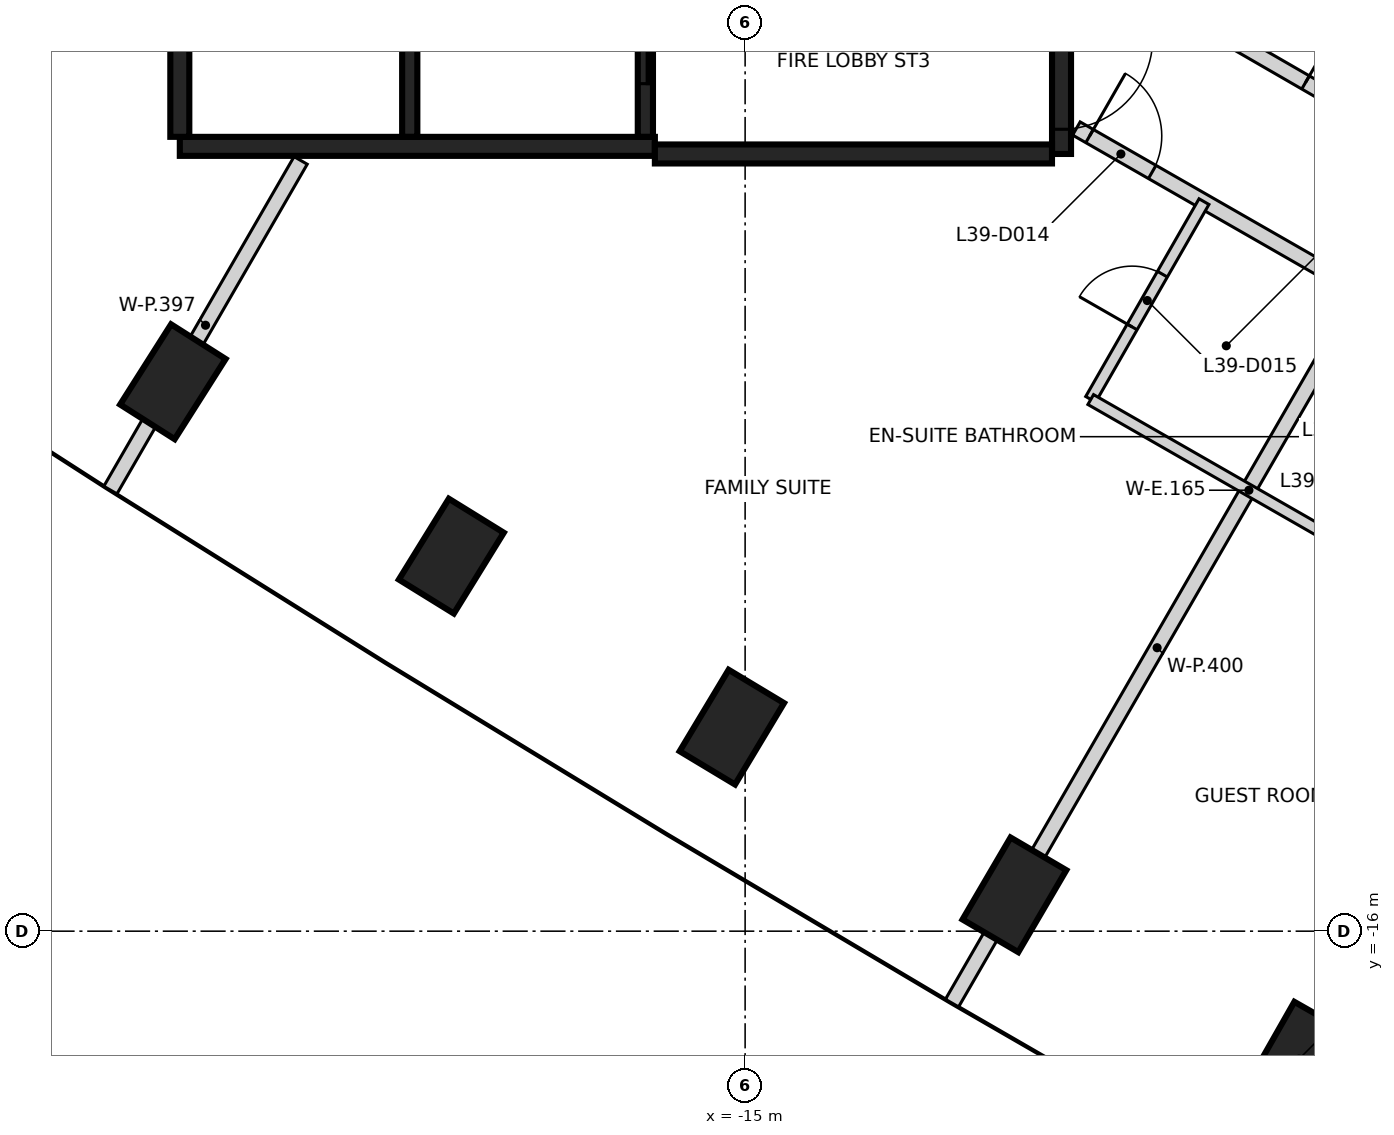
"""IFC4 building model, lengths in metres.
Left out: names, types, materials, properties, quantities, classifications, styles, units other than length and angle.
Written with IfcOpenShell. Run it as: python <this file> out.ifc"""

import sys

from ifc_helpers import new_model, si_unit, direction, frame, frame_2d, origin, origin_2d, place, context, subcontext, project, spatial, rectangle, extrude, element, fill, save


model = new_model("IFC4")
c1 = context("Model", 3, precision=1e-05, world=origin(), true_north=direction((0.0, 1.0)))
c2 = subcontext(c1, "Body", "Model", "MODEL_VIEW")
j1 = project(units=[si_unit("LENGTHUNIT", "METRE"), si_unit("PLANEANGLEUNIT", "RADIAN")], contexts=[c1])
p1 = place(None, origin())
s1 = spatial("IfcSite", under=j1, at=p1, CompositionType="ELEMENT")
p2 = place(p1, origin())
s2 = spatial("IfcBuilding", under=s1, at=p2, CompositionType="ELEMENT")
p3 = place(p2, frame((0.0, 0.0, 157.6)))
s3 = spatial("IfcBuildingStorey", under=s2, at=p3, CompositionType="ELEMENT", Elevation=157.6)
for number, where, z_axis, x_axis in (
    (1, (-22.529, -8.772, -0.4), (0.0, 0.0, 1.0), (0.536, 0.844, 0.0)),
    (2, (-18.865, -11.066, -0.4), (0.0, 0.0, 1.0), (0.526, 0.851, 0.0)),
    (3, (-15.175, -13.316, -0.4), (0.0, 0.0, 1.0), (0.515, 0.857, 0.0)),
    (4, (-11.457, -15.522, -0.4), (0.0, 0.0, 1.0), (0.505, 0.863, 0.0)),
    (5, (-7.714, -17.683, -0.4), (0.0, 0.0, 1.0), (0.495, 0.869, 0.0)),
):
    element("IfcColumn", number, at=place(p3, frame(where, z_axis=z_axis, x_axis=x_axis)), inside=s3, PredefinedType="COLUMN", context=c2, shape_type="SweptSolid", body=[
        extrude(rectangle(XDim=1.25, YDim=0.85, at=origin_2d()), origin(), (0.0, 0.0, 1.0), 3.6),
    ])
p4 = place(p3, frame((-10.837, 5.775, 0.0), z_axis=(0.0, 0.0, 1.0), x_axis=(0.0, -1.0, 0.0)))
e6 = element("IfcWall", 6, at=p4, inside=s3, PredefinedType="SHEAR", context=c2, shape_type="SweptSolid", body=[
    extrude(rectangle(XDim=11.55, YDim=0.25, at=frame_2d((5.775, 0.0))), origin(), (0.0, 0.0, 1.0), 3.2),
])
p5 = place(p4, frame((10.025, 0.0, 0.0)))
e7 = element("IfcOpeningElement", 7, at=p5, cuts=e6, PredefinedType="OPENING", context=c2, shape_type="SweptSolid", body=[
    extrude(rectangle(XDim=1.2, YDim=2.1, at=frame_2d((0.6, 1.05))), frame((0.0, 0.135, 0.0), z_axis=(0.0, -1.0, 0.0), x_axis=(1.0, 0.0, 0.0)), (0.0, 0.0, 1.0), 0.27),
])
p6 = place(p4, frame((8.725, 0.0, 0.0)))
e8 = element("IfcOpeningElement", 8, at=p6, cuts=e6, PredefinedType="OPENING", context=c2, shape_type="SweptSolid", body=[
    extrude(rectangle(XDim=1.2, YDim=2.1, at=frame_2d((0.6, 1.05))), frame((0.0, 0.135, 0.0), z_axis=(0.0, -1.0, 0.0), x_axis=(1.0, 0.0, 0.0)), (0.0, 0.0, 1.0), 0.27),
])
p7 = place(p3, frame((-16.187, -5.675, 0.0), z_axis=(0.0, 0.0, 1.0), x_axis=(-1.0, 0.0, 0.0)))
e9 = element("IfcWall", 9, at=p7, inside=s3, PredefinedType="SHEAR", context=c2, shape_type="SweptSolid", body=[
    extrude(rectangle(XDim=6.25, YDim=0.25, at=frame_2d((3.125, 0.0))), origin(), (0.0, 0.0, 1.0), 3.2),
])
p8 = place(p3, frame((-10.963, -5.775, 0.0), z_axis=(0.0, 0.0, 1.0), x_axis=(-1.0, 0.0, 0.0)))
e10 = element("IfcWall", 10, at=p8, inside=s3, PredefinedType="SHEAR", context=c2, shape_type="SweptSolid", body=[
    extrude(rectangle(XDim=5.225, YDim=0.25, at=frame_2d((2.612, 0.0))), origin(), (0.0, 0.0, 1.0), 3.2),
])
p9 = place(p3, frame((-22.437, -5.55, 0.0), z_axis=(0.0, 0.0, 1.0), x_axis=(0.0, 1.0, 0.0)))
e11 = element("IfcWall", 11, at=p9, inside=s3, PredefinedType="SHEAR", context=c2, shape_type="SweptSolid", body=[
    extrude(rectangle(XDim=1.849, YDim=0.25, at=frame_2d((0.925, 0.0))), origin(), (0.0, 0.0, 1.0), 3.2),
])
p10 = place(p3, frame((-16.312, -2.898, 0.0), z_axis=(0.0, 0.0, 1.0), x_axis=(0.0, -1.0, 0.0)))
e12 = element("IfcWall", 12, at=p10, inside=s3, PredefinedType="SHEAR", context=c2, shape_type="SweptSolid", body=[
    extrude(rectangle(XDim=2.651, YDim=0.2, at=frame_2d((1.325, 0.0))), origin(), (0.0, 0.0, 1.0), 3.2),
])
p11 = place(p10, frame((0.652, 0.0, 0.0)))
e13 = element("IfcOpeningElement", 13, at=p11, cuts=e12, PredefinedType="OPENING", context=c2, shape_type="SweptSolid", body=[
    extrude(rectangle(XDim=1.3, YDim=2.1, at=frame_2d((0.65, 1.05))), frame((0.0, 0.11, 0.0), z_axis=(0.0, -1.0, 0.0), x_axis=(1.0, 0.0, 0.0)), (0.0, 0.0, 1.0), 0.22),
])
p12 = place(p3, frame((-19.412, -5.549, 0.0), z_axis=(0.0, 0.0, 1.0), x_axis=(0.0, 1.0, 0.0)))
e14 = element("IfcWall", 14, at=p12, inside=s3, PredefinedType="SHEAR", context=c2, shape_type="SweptSolid", body=[
    extrude(rectangle(XDim=2.651, YDim=0.2, at=frame_2d((1.325, 0.0))), origin(), (0.0, 0.0, 1.0), 3.2),
])
p13 = place(p3, frame((-10.642, -5.44, 0.0), z_axis=(0.0, 0.0, 1.0), x_axis=(0.867610688994, -0.497244097344, 0.0)))
e15 = element("IfcWall", 15, at=p13, inside=s3, PredefinedType="PARTITIONING", context=c2, shape_type="SweptSolid", body=[
    extrude(rectangle(XDim=10.464, YDim=0.2, at=frame_2d((5.232, 0.0))), origin(), (0.0, 0.0, 1.0), 3.2),
])
p14 = place(p13, frame((0.2, 0.0, 0.0)))
e16 = element("IfcOpeningElement", 16, at=p14, cuts=e15, PredefinedType="OPENING", context=c2, shape_type="SweptSolid", body=[
    extrude(rectangle(XDim=0.95, YDim=2.1, at=frame_2d((0.475, 1.05))), frame((0.0, 0.11, 0.0), z_axis=(0.0, -1.0, 0.0), x_axis=(1.0, 0.0, 0.0)), (0.0, 0.0, 1.0), 0.22),
])
p15 = place(p13, frame((7.519, 0.0, 0.0)))
e17 = element("IfcOpeningElement", 17, at=p15, cuts=e15, PredefinedType="OPENING", context=c2, shape_type="SweptSolid", body=[
    extrude(rectangle(XDim=0.95, YDim=2.1, at=frame_2d((0.475, 1.05))), frame((0.0, 0.11, 0.0), z_axis=(0.0, -1.0, 0.0), x_axis=(1.0, 0.0, 0.0)), (0.0, 0.0, 1.0), 0.22),
])
p16 = place(p13, frame((8.846, 0.0, 0.0)))
e18 = element("IfcOpeningElement", 18, at=p16, cuts=e15, PredefinedType="OPENING", context=c2, shape_type="SweptSolid", body=[
    extrude(rectangle(XDim=0.95, YDim=2.1, at=frame_2d((0.475, 1.05))), frame((0.0, 0.11, 0.0), z_axis=(0.0, -1.0, 0.0), x_axis=(1.0, 0.0, 0.0)), (0.0, 0.0, 1.0), 0.22),
])
p17 = place(p3, frame((-8.612, -4.265, 0.0), z_axis=(0.0, 0.0, 1.0), x_axis=(0.865984415152, -0.500070987675, 0.0)))
e19 = element("IfcWall", 19, at=p17, inside=s3, PredefinedType="PARTITIONING", context=c2, shape_type="SweptSolid", body=[
    extrude(rectangle(XDim=10.651, YDim=0.2, at=frame_2d((5.326, 0.0))), origin(), (0.0, 0.0, 1.0), 3.2),
])
p18 = place(p17, frame((1.138, 0.0, 0.0)))
e20 = element("IfcOpeningElement", 20, at=p18, cuts=e19, PredefinedType="OPENING", context=c2, shape_type="SweptSolid", body=[
    extrude(rectangle(XDim=0.9, YDim=2.1, at=frame_2d((0.45, 1.05))), frame((0.0, 0.11, 0.0), z_axis=(0.0, -1.0, 0.0), x_axis=(1.0, 0.0, 0.0)), (0.0, 0.0, 1.0), 0.22),
])
p19 = place(p17, frame((4.876, 0.0, 0.0)))
e21 = element("IfcOpeningElement", 21, at=p19, cuts=e19, PredefinedType="OPENING", context=c2, shape_type="SweptSolid", body=[
    extrude(rectangle(XDim=0.9, YDim=2.1, at=frame_2d((0.45, 1.05))), frame((0.0, 0.11, 0.0), z_axis=(0.0, -1.0, 0.0), x_axis=(1.0, 0.0, 0.0)), (0.0, 0.0, 1.0), 0.22),
])
p20 = place(p17, frame((8.613, 0.0, 0.0)))
e22 = element("IfcOpeningElement", 22, at=p20, cuts=e19, PredefinedType="OPENING", context=c2, shape_type="SweptSolid", body=[
    extrude(rectangle(XDim=0.9, YDim=2.1, at=frame_2d((0.45, 1.05))), frame((0.0, 0.11, 0.0), z_axis=(0.0, -1.0, 0.0), x_axis=(1.0, 0.0, 0.0)), (0.0, 0.0, 1.0), 0.22),
])
p21 = place(p3, frame((-23.351, -10.197, 0.0), z_axis=(0.0, 0.0, 1.0), x_axis=(0.499872996861, 0.866098716665, 0.0)))
e23 = element("IfcWall", 23, at=p21, inside=s3, PredefinedType="PARTITIONING", context=c2, shape_type="SweptSolid", body=[
    extrude(rectangle(XDim=5.007, YDim=0.2, at=frame_2d((2.503, 0.0))), origin(), (0.0, 0.0, 1.0), 3.2),
])
p22 = place(p3, frame((-12.278, -16.946, 0.0), z_axis=(0.0, 0.0, 1.0), x_axis=(0.499882324153, 0.866093333307, 0.0)))
e24 = element("IfcWall", 24, at=p22, inside=s3, PredefinedType="PARTITIONING", context=c2, shape_type="SweptSolid", body=[
    extrude(rectangle(XDim=10.796, YDim=0.2, at=frame_2d((5.398, 0.0))), origin(), (0.0, 0.0, 1.0), 3.2),
])
p23 = place(p3, frame((-8.535, -19.107, 0.0), z_axis=(0.0, 0.0, 1.0), x_axis=(0.499987057201, 0.866032876184, 0.0)))
e25 = element("IfcWall", 25, at=p23, inside=s3, PredefinedType="PARTITIONING", context=c2, shape_type="SweptSolid", body=[
    extrude(rectangle(XDim=10.809, YDim=0.2, at=frame_2d((5.404, 0.0))), origin(), (0.0, 0.0, 1.0), 3.2),
])
p24 = place(p3, frame((-8.0, -0.924, 0.0), z_axis=(0.0, 0.0, 1.0), x_axis=(0.86604129137, -0.499972480886, 0.0)))
e26 = element("IfcWall", 26, at=p24, inside=s3, PredefinedType="PARTITIONING", context=c2, shape_type="SweptSolid", body=[
    extrude(rectangle(XDim=12.932, YDim=0.2, at=frame_2d((6.466, 0.0))), origin(), (0.0, 0.0, 1.0), 2.3),
])
p25 = place(p3, frame((-10.454, -9.003, 0.0), z_axis=(0.0, 0.0, 1.0), x_axis=(0.49740127306, 0.867520589703, 0.0)))
e27 = element("IfcWall", 27, at=p25, inside=s3, PredefinedType="PARTITIONING", context=c2, shape_type="SweptSolid", body=[
    extrude(rectangle(XDim=2.998, YDim=0.15, at=frame_2d((1.499, 0.0))), origin(), (0.0, 0.0, 1.0), 3.2),
])
p26 = place(p25, frame((1.098, 0.0, 0.0)))
e28 = element("IfcOpeningElement", 28, at=p26, cuts=e27, PredefinedType="OPENING", context=c2, shape_type="SweptSolid", body=[
    extrude(rectangle(XDim=0.8, YDim=2.1, at=frame_2d((0.4, 1.05))), frame((0.0, 0.085, 0.0), z_axis=(0.0, -1.0, 0.0), x_axis=(1.0, 0.0, 0.0)), (0.0, 0.0, 1.0), 0.17),
])
p27 = place(p3, frame((-10.453, -9.006, 0.0), z_axis=(0.0, 0.0, 1.0), x_axis=(0.86760039778, -0.49726205342, 0.0)))
e29 = element("IfcWall", 29, at=p27, inside=s3, PredefinedType="PARTITIONING", context=c2, shape_type="SweptSolid", body=[
    extrude(rectangle(XDim=4.797, YDim=0.15, at=frame_2d((2.399, 0.0))), origin(), (0.0, 0.0, 1.0), 3.2),
])
p28 = place(p11, origin())
e30 = element("IfcDoor", 30, at=p28, inside=s3, OperationType="SLIDING_TO_LEFT", PredefinedType="DOOR", context=c2, shape_type="SweptSolid", body=[
    extrude(rectangle(XDim=1.3, YDim=2.1, at=frame_2d((0.65, 1.05))), frame((0.0, 0.025, 0.0), z_axis=(0.0, -1.0, 0.0), x_axis=(1.0, 0.0, 0.0)), (0.0, 0.0, 1.0), 0.05),
])
fill(e13, e30)
p29 = place(p5, origin())
e31 = element("IfcDoor", 31, at=p29, inside=s3, OperationType="SINGLE_SWING_LEFT", PredefinedType="DOOR", context=c2, shape_type="SweptSolid", body=[
    extrude(rectangle(XDim=1.2, YDim=2.1, at=frame_2d((0.6, 1.05))), frame((0.0, 0.025, 0.0), z_axis=(0.0, -1.0, 0.0), x_axis=(1.0, 0.0, 0.0)), (0.0, 0.0, 1.0), 0.05),
])
fill(e7, e31)
p30 = place(p14, frame((0.95, 0.0, 0.0), z_axis=(0.0, 0.0, 1.0), x_axis=(-1.0, 0.0, 0.0)))
e32 = element("IfcDoor", 32, at=p30, inside=s3, OperationType="SINGLE_SWING_LEFT", PredefinedType="DOOR", context=c2, shape_type="SweptSolid", body=[
    extrude(rectangle(XDim=0.95, YDim=2.1, at=frame_2d((0.475, 1.05))), frame((0.0, 0.025, 0.0), z_axis=(0.0, -1.0, 0.0), x_axis=(1.0, 0.0, 0.0)), (0.0, 0.0, 1.0), 0.05),
])
fill(e16, e32)
p31 = place(p26, origin())
e33 = element("IfcDoor", 33, at=p31, inside=s3, OperationType="SINGLE_SWING_LEFT", PredefinedType="DOOR", context=c2, shape_type="SweptSolid", body=[
    extrude(rectangle(XDim=0.8, YDim=2.1, at=frame_2d((0.4, 1.05))), frame((0.0, 0.025, 0.0), z_axis=(0.0, -1.0, 0.0), x_axis=(1.0, 0.0, 0.0)), (0.0, 0.0, 1.0), 0.05),
])
fill(e28, e33)
p32 = place(p18, origin())
e34 = element("IfcDoor", 34, at=p32, inside=s3, OperationType="SINGLE_SWING_LEFT", PredefinedType="DOOR", context=c2, shape_type="SweptSolid", body=[
    extrude(rectangle(XDim=0.9, YDim=2.1, at=frame_2d((0.45, 1.05))), frame((0.0, 0.025, 0.0), z_axis=(0.0, -1.0, 0.0), x_axis=(1.0, 0.0, 0.0)), (0.0, 0.0, 1.0), 0.05),
])
fill(e20, e34)
save(model, sys.argv[1])
